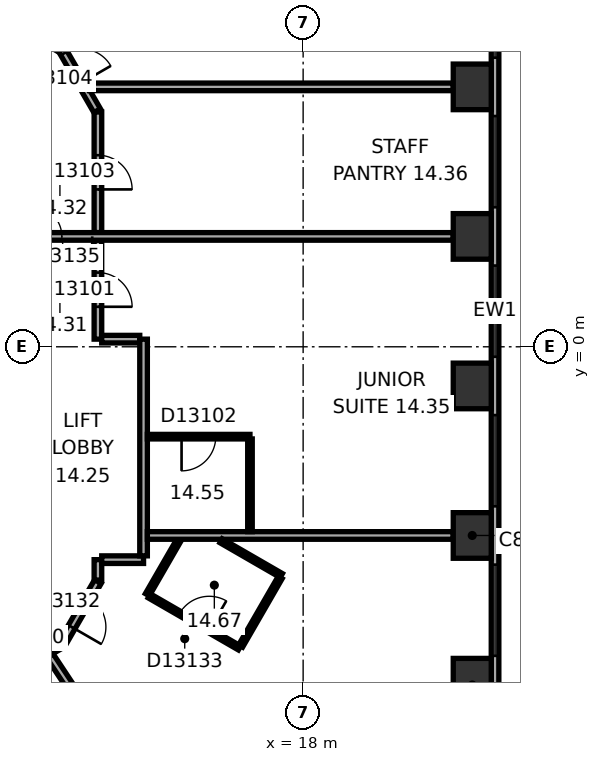
"""IFC4 building model, lengths in metres.
Left out: names, types, materials, properties, quantities, classifications, styles, units other than length and angle.
Written with IfcOpenShell. Run it as: python <this file> out.ifc"""

import sys

from ifc_helpers import new_model, si_unit, direction, frame, frame_2d, origin, origin_2d, place, context, subcontext, project, spatial, rectangle, extrude, element, fill, save


model = new_model("IFC4")
c1 = context("Model", 3, precision=1e-05, world=origin(), true_north=direction((0.0, 1.0)))
c2 = subcontext(c1, "Body", "Model", "MODEL_VIEW")
j1 = project(units=[si_unit("LENGTHUNIT", "METRE"), si_unit("PLANEANGLEUNIT", "RADIAN")], contexts=[c1])
p1 = place(None, origin())
s1 = spatial("IfcSite", under=j1, at=p1, CompositionType="ELEMENT")
p2 = place(p1, origin())
s2 = spatial("IfcBuilding", under=s1, at=p2, CompositionType="ELEMENT")
p3 = place(p2, frame((0.0, 0.0, 67.1)))
s3 = spatial("IfcBuildingStorey", under=s2, at=p3, CompositionType="ELEMENT", Elevation=67.1)
p4 = place(p3, frame((22.45, -8.899, 0.0), z_axis=(0.0, 0.0, 1.0), x_axis=(0.0, 1.0, 0.0)))
e1 = element("IfcColumn", 1, at=p4, inside=s3, PredefinedType="COLUMN", context=c2, shape_type="SweptSolid", body=[
    extrude(rectangle(XDim=1.4, YDim=1.0, at=origin_2d()), origin(), (0.0, 0.0, 1.0), 3.3),
])
for number, where, z_axis, x_axis in (
    (2, (22.45, -4.965, 0.0), (0.0, 0.0, 1.0), (0.0, 1.0, 0.0)),
    (3, (22.45, -1.03, 0.0), (0.0, 0.0, 1.0), (0.0, 1.0, 0.0)),
    (4, (22.45, 2.905, 0.0), (0.0, 0.0, 1.0), (0.0, 1.0, 0.0)),
    (5, (22.45, 6.839, 0.0), (0.0, 0.0, 1.0), (0.0, 1.0, 0.0)),
):
    element("IfcColumn", number, at=place(p3, frame(where, z_axis=z_axis, x_axis=x_axis)), inside=s3, PredefinedType="COLUMN", context=c2, shape_type="SweptSolid", body=[
        extrude(rectangle(XDim=1.2, YDim=1.0, at=origin_2d()), origin(), (0.0, 0.0, 1.0), 3.3),
    ])
p5 = place(p3, frame((23.05, -9.687, 0.0), z_axis=(0.0, 0.0, 1.0), x_axis=(0.0, 1.0, 0.0)))
e6 = element("IfcWall", 6, at=p5, inside=s3, PredefinedType="STANDARD", context=c2, shape_type="SweptSolid", body=[
    extrude(rectangle(XDim=21.246, YDim=0.2, at=frame_2d((10.623, 0.0))), origin(), (0.0, 0.0, 1.0), 3.3),
])
p6 = place(p5, frame((1.555, 0.0, 0.8)))
e7 = element("IfcOpeningElement", 7, at=p6, cuts=e6, PredefinedType="OPENING", context=c2, shape_type="SweptSolid", body=[
    extrude(rectangle(XDim=2.4, YDim=1.7, at=frame_2d((1.2, 0.85))), frame((0.0, 0.11, 0.0), z_axis=(0.0, -1.0, 0.0), x_axis=(1.0, 0.0, 0.0)), (0.0, 0.0, 1.0), 0.22),
])
p7 = place(p5, frame((5.489, 0.0, 0.8)))
e8 = element("IfcOpeningElement", 8, at=p7, cuts=e6, PredefinedType="OPENING", context=c2, shape_type="SweptSolid", body=[
    extrude(rectangle(XDim=2.4, YDim=1.7, at=frame_2d((1.2, 0.85))), frame((0.0, 0.11, 0.0), z_axis=(0.0, -1.0, 0.0), x_axis=(1.0, 0.0, 0.0)), (0.0, 0.0, 1.0), 0.22),
])
p8 = place(p5, frame((9.424, 0.0, 0.8)))
e9 = element("IfcOpeningElement", 9, at=p8, cuts=e6, PredefinedType="OPENING", context=c2, shape_type="SweptSolid", body=[
    extrude(rectangle(XDim=2.4, YDim=1.7, at=frame_2d((1.2, 0.85))), frame((0.0, 0.11, 0.0), z_axis=(0.0, -1.0, 0.0), x_axis=(1.0, 0.0, 0.0)), (0.0, 0.0, 1.0), 0.22),
])
p9 = place(p5, frame((13.358, 0.0, 0.8)))
e10 = element("IfcOpeningElement", 10, at=p9, cuts=e6, PredefinedType="OPENING", context=c2, shape_type="SweptSolid", body=[
    extrude(rectangle(XDim=2.4, YDim=1.7, at=frame_2d((1.2, 0.85))), frame((0.0, 0.11, 0.0), z_axis=(0.0, -1.0, 0.0), x_axis=(1.0, 0.0, 0.0)), (0.0, 0.0, 1.0), 0.22),
])
p10 = place(p5, frame((17.293, 0.0, 0.8)))
e11 = element("IfcOpeningElement", 11, at=p10, cuts=e6, PredefinedType="OPENING", context=c2, shape_type="SweptSolid", body=[
    extrude(rectangle(XDim=2.4, YDim=1.7, at=frame_2d((1.2, 0.85))), frame((0.0, 0.11, 0.0), z_axis=(0.0, -1.0, 0.0), x_axis=(1.0, 0.0, 0.0)), (0.0, 0.0, 1.0), 0.22),
])
p11 = place(p3, frame((9.852, -8.861, 0.0), z_axis=(0.0, 0.0, 1.0), x_axis=(0.866013291437, 0.500020978615, 0.0)))
e12 = element("IfcWall", 12, at=p11, inside=s3, PredefinedType="PARTITIONING", context=c2, shape_type="SweptSolid", body=[
    extrude(rectangle(XDim=2.077, YDim=0.2, at=frame_2d((1.038, 0.0))), origin(), (0.0, 0.0, 1.0), 3.05),
])
p12 = place(p3, frame((11.67, -7.788, 0.0), z_axis=(0.0, 0.0, 1.0), x_axis=(0.500063286585, 0.865988862174, 0.0)))
e13 = element("IfcWall", 13, at=p12, inside=s3, PredefinedType="PARTITIONING", context=c2, shape_type="SweptSolid", body=[
    extrude(rectangle(XDim=1.86, YDim=0.2, at=frame_2d((0.93, 0.0))), origin(), (0.0, 0.0, 1.0), 3.05),
])
p13 = place(p12, frame((0.48, 0.0, 0.0)))
e14 = element("IfcOpeningElement", 14, at=p13, cuts=e13, PredefinedType="OPENING", context=c2, shape_type="SweptSolid", body=[
    extrude(rectangle(XDim=0.9, YDim=2.1, at=frame_2d((0.45, 1.05))), frame((0.0, 0.11, 0.0), z_axis=(0.0, -1.0, 0.0), x_axis=(1.0, 0.0, 0.0)), (0.0, 0.0, 1.0), 0.22),
])
p14 = place(p3, frame((12.58, 6.212, 0.0), z_axis=(0.0, 0.0, 1.0), x_axis=(-0.500063286585, 0.865988862174, 0.0)))
e15 = element("IfcWall", 15, at=p14, inside=s3, PredefinedType="PARTITIONING", context=c2, shape_type="SweptSolid", body=[
    extrude(rectangle(XDim=1.86, YDim=0.2, at=frame_2d((0.93, 0.0))), origin(), (0.0, 0.0, 1.0), 3.05),
])
p15 = place(p14, frame((0.842, 0.0, 0.0)))
e16 = element("IfcOpeningElement", 16, at=p15, cuts=e15, PredefinedType="OPENING", context=c2, shape_type="SweptSolid", body=[
    extrude(rectangle(XDim=0.9, YDim=2.1, at=frame_2d((0.45, 1.05))), frame((0.0, 0.11, 0.0), z_axis=(0.0, -1.0, 0.0), x_axis=(1.0, 0.0, 0.0)), (0.0, 0.0, 1.0), 0.22),
])
p16 = place(p3, frame((12.6, -6.138, 0.0), z_axis=(0.0, 0.0, 1.0), x_axis=(0.0, 1.0, 0.0)))
e17 = element("IfcWall", 17, at=p16, inside=s3, PredefinedType="PARTITIONING", context=c2, shape_type="SweptSolid", body=[
    extrude(rectangle(XDim=0.537, YDim=0.2, at=frame_2d((0.268, 0.0))), origin(), (0.0, 0.0, 1.0), 3.05),
])
p17 = place(p3, frame((12.6, 0.201, 0.0), z_axis=(0.0, 0.0, 1.0), x_axis=(0.0, 1.0, 0.0)))
e18 = element("IfcWall", 18, at=p17, inside=s3, PredefinedType="PARTITIONING", context=c2, shape_type="SweptSolid", body=[
    extrude(rectangle(XDim=2.604, YDim=0.2, at=frame_2d((1.302, 0.0))), origin(), (0.0, 0.0, 1.0), 3.05),
])
p18 = place(p17, frame((0.852, 0.0, 0.0)))
e19 = element("IfcOpeningElement", 19, at=p18, cuts=e18, PredefinedType="OPENING", context=c2, shape_type="SweptSolid", body=[
    extrude(rectangle(XDim=0.9, YDim=2.1, at=frame_2d((0.45, 1.05))), frame((0.0, 0.11, 0.0), z_axis=(0.0, -1.0, 0.0), x_axis=(1.0, 0.0, 0.0)), (0.0, 0.0, 1.0), 0.22),
])
p19 = place(p3, frame((12.6, 3.004, 0.0), z_axis=(0.0, 0.0, 1.0), x_axis=(0.0, 1.0, 0.0)))
e20 = element("IfcWall", 20, at=p19, inside=s3, PredefinedType="PARTITIONING", context=c2, shape_type="SweptSolid", body=[
    extrude(rectangle(XDim=3.173, YDim=0.2, at=frame_2d((1.586, 0.0))), origin(), (0.0, 0.0, 1.0), 3.05),
])
p20 = place(p19, frame((1.136, 0.0, 0.0)))
e21 = element("IfcOpeningElement", 21, at=p20, cuts=e20, PredefinedType="OPENING", context=c2, shape_type="SweptSolid", body=[
    extrude(rectangle(XDim=0.9, YDim=2.1, at=frame_2d((0.45, 1.05))), frame((0.0, 0.11, 0.0), z_axis=(0.0, -1.0, 0.0), x_axis=(1.0, 0.0, 0.0)), (0.0, 0.0, 1.0), 0.22),
])
p21 = place(p3, frame((12.7, -5.601, 0.0), z_axis=(0.0, 0.0, 1.0), x_axis=(1.0, 0.0, 0.0)))
e22 = element("IfcWall", 22, at=p21, inside=s3, PredefinedType="PARTITIONING", context=c2, shape_type="SweptSolid", body=[
    extrude(rectangle(XDim=1.101, YDim=0.2, at=frame_2d((0.551, 0.0))), origin(), (0.0, 0.0, 1.0), 3.05),
])
p22 = place(p3, frame((13.701, 0.201, 0.0), z_axis=(0.0, 0.0, 1.0), x_axis=(-1.0, 0.0, 0.0)))
e23 = element("IfcWall", 23, at=p22, inside=s3, PredefinedType="PARTITIONING", context=c2, shape_type="SweptSolid", body=[
    extrude(rectangle(XDim=1.001, YDim=0.2, at=frame_2d((0.5, 0.0))), origin(), (0.0, 0.0, 1.0), 3.05),
])
p23 = place(p3, frame((13.801, -5.501, 0.0), z_axis=(0.0, 0.0, 1.0), x_axis=(0.0, 1.0, 0.0)))
e24 = element("IfcWall", 24, at=p23, inside=s3, PredefinedType="PARTITIONING", context=c2, shape_type="SweptSolid", body=[
    extrude(rectangle(XDim=5.702, YDim=0.2, at=frame_2d((2.851, 0.0))), origin(), (0.0, 0.0, 1.0), 3.05),
])
p24 = place(p3, frame((13.901, -6.524, 0.0), z_axis=(0.0, 0.0, 1.0), x_axis=(0.499964162598, 0.86604609353, 0.0)))
e25 = element("IfcWall", 25, at=p24, inside=s3, PredefinedType="PARTITIONING", context=c2, shape_type="SweptSolid", body=[
    extrude(rectangle(XDim=1.661, YDim=0.12, at=frame_2d((0.831, 0.0))), origin(), (0.0, 0.0, 1.0), 3.05),
])
p25 = place(p3, frame((13.901, -4.965, 0.0), z_axis=(0.0, 0.0, 1.0), x_axis=(1.0, 0.0, 0.0)))
e26 = element("IfcWall", 26, at=p25, inside=s3, PredefinedType="PARTITIONING", context=c2, shape_type="SweptSolid", body=[
    extrude(rectangle(XDim=8.049, YDim=0.2, at=frame_2d((4.024, 0.0))), origin(), (0.0, 0.0, 1.0), 3.05),
])
p26 = place(p3, frame((13.901, -2.365, 0.0), z_axis=(0.0, 0.0, 1.0), x_axis=(1.0, 0.0, 0.0)))
e27 = element("IfcWall", 27, at=p26, inside=s3, PredefinedType="PARTITIONING", context=c2, shape_type="SweptSolid", body=[
    extrude(rectangle(XDim=2.7, YDim=0.12, at=frame_2d((1.35, 0.0))), origin(), (0.0, 0.0, 1.0), 3.05),
])
p27 = place(p26, frame((0.9, 0.0, 0.0)))
e28 = element("IfcOpeningElement", 28, at=p27, cuts=e27, PredefinedType="OPENING", context=c2, shape_type="SweptSolid", body=[
    extrude(rectangle(XDim=0.9, YDim=2.1, at=frame_2d((0.45, 1.05))), frame((0.0, 0.07, 0.0), z_axis=(0.0, -1.0, 0.0), x_axis=(1.0, 0.0, 0.0)), (0.0, 0.0, 1.0), 0.14),
])
p28 = place(p3, frame((15.841, -5.104, 0.0), z_axis=(0.0, 0.0, 1.0), x_axis=(0.866025591402, -0.499999675036, 0.0)))
e29 = element("IfcWall", 29, at=p28, inside=s3, PredefinedType="PARTITIONING", context=c2, shape_type="SweptSolid", body=[
    extrude(rectangle(XDim=1.83, YDim=0.12, at=frame_2d((0.915, 0.0))), origin(), (0.0, 0.0, 1.0), 3.05),
])
p29 = place(p3, frame((16.255, -15.564, 0.0), z_axis=(0.0, 0.0, 1.0), x_axis=(-0.55192208744, 0.833895682562, 0.0)))
e30 = element("IfcWall", 30, at=p29, inside=s3, PredefinedType="PARTITIONING", context=c2, shape_type="SweptSolid", body=[
    extrude(rectangle(XDim=8.913, YDim=0.2, at=frame_2d((4.457, 0.0))), origin(), (0.0, 0.0, 1.0), 2.6),
])
p30 = place(p3, frame((16.326, -7.925, 0.0), z_axis=(0.0, 0.0, 1.0), x_axis=(-0.865997131366, 0.500048966069, 0.0)))
e31 = element("IfcWall", 31, at=p30, inside=s3, PredefinedType="PARTITIONING", context=c2, shape_type="SweptSolid", body=[
    extrude(rectangle(XDim=2.74, YDim=0.12, at=frame_2d((1.37, 0.0))), origin(), (0.0, 0.0, 1.0), 3.05),
])
p31 = place(p30, frame((0.92, 0.0, 0.0)))
e32 = element("IfcOpeningElement", 32, at=p31, cuts=e31, PredefinedType="OPENING", context=c2, shape_type="SweptSolid", body=[
    extrude(rectangle(XDim=0.9, YDim=2.1, at=frame_2d((0.45, 1.05))), frame((0.0, 0.07, 0.0), z_axis=(0.0, -1.0, 0.0), x_axis=(1.0, 0.0, 0.0)), (0.0, 0.0, 1.0), 0.14),
])
p32 = place(p3, frame((16.601, -2.425, 0.0), z_axis=(0.0, 0.0, 1.0), x_axis=(0.0, -1.0, 0.0)))
e33 = element("IfcWall", 33, at=p32, inside=s3, PredefinedType="PARTITIONING", context=c2, shape_type="SweptSolid", body=[
    extrude(rectangle(XDim=2.44, YDim=0.12, at=frame_2d((1.22, 0.0))), origin(), (0.0, 0.0, 1.0), 3.05),
])
p33 = place(p3, frame((17.396, -6.071, 0.0), z_axis=(0.0, 0.0, 1.0), x_axis=(-0.500027264788, -0.866009661879, 0.0)))
e34 = element("IfcWall", 34, at=p33, inside=s3, PredefinedType="PARTITIONING", context=c2, shape_type="SweptSolid", body=[
    extrude(rectangle(XDim=2.08, YDim=0.12, at=frame_2d((1.04, 0.0))), origin(), (0.0, 0.0, 1.0), 3.05),
])
p34 = place(p3, frame((21.95, 2.905, 0.0), z_axis=(0.0, 0.0, 1.0), x_axis=(-1.0, 0.0, 0.0)))
e35 = element("IfcWall", 35, at=p34, inside=s3, PredefinedType="PARTITIONING", context=c2, shape_type="SweptSolid", body=[
    extrude(rectangle(XDim=11.25, YDim=0.2, at=frame_2d((5.625, 0.0))), origin(), (0.0, 0.0, 1.0), 3.05),
])
p35 = place(p34, frame((9.5, 0.0, 0.0)))
e36 = element("IfcOpeningElement", 36, at=p35, cuts=e35, PredefinedType="OPENING", context=c2, shape_type="SweptSolid", body=[
    extrude(rectangle(XDim=1.6, YDim=2.1, at=frame_2d((0.8, 1.05))), frame((0.0, 0.11, 0.0), z_axis=(0.0, -1.0, 0.0), x_axis=(1.0, 0.0, 0.0)), (0.0, 0.0, 1.0), 0.22),
])
p36 = place(p3, frame((21.95, 6.839, 0.0), z_axis=(0.0, 0.0, 1.0), x_axis=(-1.0, 0.0, 0.0)))
e37 = element("IfcWall", 37, at=p36, inside=s3, PredefinedType="PARTITIONING", context=c2, shape_type="SweptSolid", body=[
    extrude(rectangle(XDim=9.572, YDim=0.2, at=frame_2d((4.786, 0.0))), origin(), (0.0, 0.0, 1.0), 3.05),
])
p37 = place(p6, origin())
e38 = element("IfcWindow", 38, at=p37, inside=s3, PartitioningType="SINGLE_PANEL", PredefinedType="WINDOW", context=c2, shape_type="SweptSolid", body=[
    extrude(rectangle(XDim=2.4, YDim=1.7, at=frame_2d((1.2, 0.85))), frame((0.0, 0.03, 0.0), z_axis=(0.0, -1.0, 0.0), x_axis=(1.0, 0.0, 0.0)), (0.0, 0.0, 1.0), 0.06),
])
fill(e7, e38)
p38 = place(p7, origin())
e39 = element("IfcWindow", 39, at=p38, inside=s3, PartitioningType="SINGLE_PANEL", PredefinedType="WINDOW", context=c2, shape_type="SweptSolid", body=[
    extrude(rectangle(XDim=2.4, YDim=1.7, at=frame_2d((1.2, 0.85))), frame((0.0, 0.03, 0.0), z_axis=(0.0, -1.0, 0.0), x_axis=(1.0, 0.0, 0.0)), (0.0, 0.0, 1.0), 0.06),
])
fill(e8, e39)
p39 = place(p8, origin())
e40 = element("IfcWindow", 40, at=p39, inside=s3, PartitioningType="SINGLE_PANEL", PredefinedType="WINDOW", context=c2, shape_type="SweptSolid", body=[
    extrude(rectangle(XDim=2.4, YDim=1.7, at=frame_2d((1.2, 0.85))), frame((0.0, 0.03, 0.0), z_axis=(0.0, -1.0, 0.0), x_axis=(1.0, 0.0, 0.0)), (0.0, 0.0, 1.0), 0.06),
])
fill(e9, e40)
p40 = place(p9, origin())
e41 = element("IfcWindow", 41, at=p40, inside=s3, PartitioningType="SINGLE_PANEL", PredefinedType="WINDOW", context=c2, shape_type="SweptSolid", body=[
    extrude(rectangle(XDim=2.4, YDim=1.7, at=frame_2d((1.2, 0.85))), frame((0.0, 0.03, 0.0), z_axis=(0.0, -1.0, 0.0), x_axis=(1.0, 0.0, 0.0)), (0.0, 0.0, 1.0), 0.06),
])
fill(e10, e41)
p41 = place(p10, origin())
e42 = element("IfcWindow", 42, at=p41, inside=s3, PartitioningType="SINGLE_PANEL", PredefinedType="WINDOW", context=c2, shape_type="SweptSolid", body=[
    extrude(rectangle(XDim=2.4, YDim=1.7, at=frame_2d((1.2, 0.85))), frame((0.0, 0.03, 0.0), z_axis=(0.0, -1.0, 0.0), x_axis=(1.0, 0.0, 0.0)), (0.0, 0.0, 1.0), 0.06),
])
fill(e11, e42)
p42 = place(p18, origin())
e43 = element("IfcDoor", 43, at=p42, inside=s3, OperationType="SINGLE_SWING_LEFT", PredefinedType="DOOR", context=c2, shape_type="SweptSolid", body=[
    extrude(rectangle(XDim=0.9, YDim=2.1, at=frame_2d((0.45, 1.05))), frame((0.0, 0.025, 0.0), z_axis=(0.0, -1.0, 0.0), x_axis=(1.0, 0.0, 0.0)), (0.0, 0.0, 1.0), 0.05),
])
fill(e19, e43)
p43 = place(p27, origin())
e44 = element("IfcDoor", 44, at=p43, inside=s3, OperationType="SINGLE_SWING_LEFT", PredefinedType="DOOR", context=c2, shape_type="SweptSolid", body=[
    extrude(rectangle(XDim=0.9, YDim=2.1, at=frame_2d((0.45, 1.05))), frame((0.0, 0.025, 0.0), z_axis=(0.0, -1.0, 0.0), x_axis=(1.0, 0.0, 0.0)), (0.0, 0.0, 1.0), 0.05),
])
fill(e28, e44)
p44 = place(p20, origin())
e45 = element("IfcDoor", 45, at=p44, inside=s3, OperationType="SINGLE_SWING_LEFT", PredefinedType="DOOR", context=c2, shape_type="SweptSolid", body=[
    extrude(rectangle(XDim=0.9, YDim=2.1, at=frame_2d((0.45, 1.05))), frame((0.0, 0.025, 0.0), z_axis=(0.0, -1.0, 0.0), x_axis=(1.0, 0.0, 0.0)), (0.0, 0.0, 1.0), 0.05),
])
fill(e21, e45)
p45 = place(p15, origin())
e46 = element("IfcDoor", 46, at=p45, inside=s3, OperationType="SINGLE_SWING_LEFT", PredefinedType="DOOR", context=c2, shape_type="SweptSolid", body=[
    extrude(rectangle(XDim=0.9, YDim=2.1, at=frame_2d((0.45, 1.05))), frame((0.0, 0.025, 0.0), z_axis=(0.0, -1.0, 0.0), x_axis=(1.0, 0.0, 0.0)), (0.0, 0.0, 1.0), 0.05),
])
fill(e16, e46)
p46 = place(p13, origin())
e47 = element("IfcDoor", 47, at=p46, inside=s3, OperationType="SINGLE_SWING_LEFT", PredefinedType="DOOR", context=c2, shape_type="SweptSolid", body=[
    extrude(rectangle(XDim=0.9, YDim=2.1, at=frame_2d((0.45, 1.05))), frame((0.0, 0.025, 0.0), z_axis=(0.0, -1.0, 0.0), x_axis=(1.0, 0.0, 0.0)), (0.0, 0.0, 1.0), 0.05),
])
fill(e14, e47)
p47 = place(p31, origin())
e48 = element("IfcDoor", 48, at=p47, inside=s3, OperationType="SINGLE_SWING_LEFT", PredefinedType="DOOR", context=c2, shape_type="SweptSolid", body=[
    extrude(rectangle(XDim=0.9, YDim=2.1, at=frame_2d((0.45, 1.05))), frame((0.0, 0.025, 0.0), z_axis=(0.0, -1.0, 0.0), x_axis=(1.0, 0.0, 0.0)), (0.0, 0.0, 1.0), 0.05),
])
fill(e32, e48)
p48 = place(p35, origin())
e49 = element("IfcDoor", 49, at=p48, inside=s3, OperationType="DOUBLE_DOOR_SINGLE_SWING", PredefinedType="DOOR", context=c2, shape_type="SweptSolid", body=[
    extrude(rectangle(XDim=1.6, YDim=2.1, at=frame_2d((0.8, 1.05))), frame((0.0, 0.025, 0.0), z_axis=(0.0, -1.0, 0.0), x_axis=(1.0, 0.0, 0.0)), (0.0, 0.0, 1.0), 0.05),
])
fill(e36, e49)
save(model, sys.argv[1])
